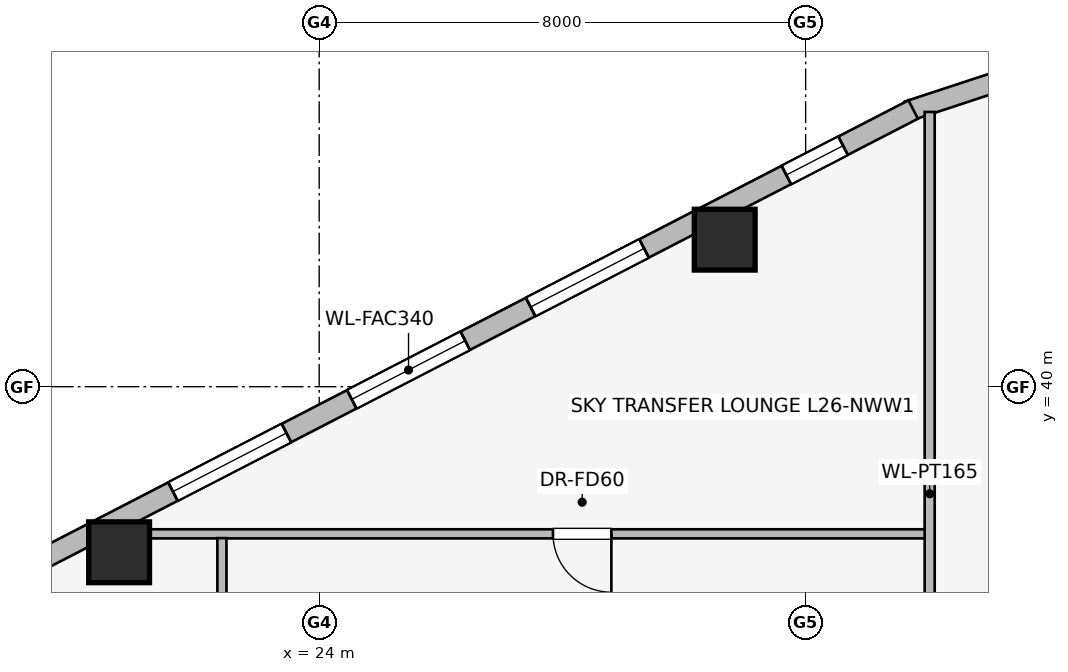
"""IFC4 building model, lengths in metres.
Left out: names, types, materials, properties, quantities, classifications, styles, units other than length and angle.
Written with IfcOpenShell. Run it as: python <this file> out.ifc"""

import sys

from ifc_helpers import new_model, si_unit, direction, frame, frame_2d, origin, origin_2d, place, context, subcontext, project, spatial, rectangle, extrude, element, fill, save


model = new_model("IFC4")
c1 = context("Model", 3, precision=1e-05, world=origin(), true_north=direction((0.0, 1.0)))
c2 = subcontext(c1, "Body", "Model", "MODEL_VIEW")
j1 = project(units=[si_unit("LENGTHUNIT", "METRE"), si_unit("PLANEANGLEUNIT", "RADIAN")], contexts=[c1])
p1 = place(None, origin())
s1 = spatial("IfcSite", under=j1, at=p1, CompositionType="ELEMENT")
p2 = place(p1, origin())
s2 = spatial("IfcBuilding", under=s1, at=p2, CompositionType="ELEMENT")
p3 = place(p2, frame((0.0, 0.0, 101.55)))
s3 = spatial("IfcBuildingStorey", under=s2, at=p3, CompositionType="ELEMENT", Elevation=101.55)
for number, where, z_axis, x_axis in (
    (1, (30.669, 42.418, 0.0), (0.0, 0.0, 1.0), (1.0, 0.0, 0.0)),
    (2, (20.709, 37.277, 0.0), (0.0, 0.0, 1.0), (1.0, 0.0, 0.0)),
):
    element("IfcColumn", number, at=place(p3, frame(where, z_axis=z_axis, x_axis=x_axis)), inside=s3, PredefinedType="COLUMN", context=c2, shape_type="SweptSolid", body=[
        extrude(rectangle(XDim=1.0, YDim=1.0, at=origin_2d()), origin(), (0.0, 0.0, 1.0), 3.45),
    ])
p4 = place(p3, frame((33.681, 44.532, 0.0), z_axis=(0.0, 0.0, 1.0), x_axis=(0.949937416267, 0.312440242569, 0.0)))
e3 = element("IfcWall", 3, at=p4, inside=s3, PredefinedType="STANDARD", context=c2, shape_type="SweptSolid", body=[
    extrude(rectangle(XDim=1.722, YDim=0.33, at=frame_2d((0.861, 0.0))), origin(), (0.0, 0.0, 1.0), 3.19),
])
p5 = place(p3, frame((17.169, 35.99, 0.0), z_axis=(0.0, 0.0, 1.0), x_axis=(0.888613612362, 0.458656568606, 0.0)))
e4 = element("IfcWall", 4, at=p5, inside=s3, PredefinedType="STANDARD", context=c2, shape_type="SweptSolid", body=[
    extrude(rectangle(XDim=18.681, YDim=0.34, at=frame_2d((9.34, 0.0))), origin(), (0.0, 0.0, 1.0), 2.494),
])
p6 = place(p5, frame((1.298, 0.0, 0.75)))
e5 = element("IfcOpeningElement", 5, at=p6, cuts=e4, PredefinedType="OPENING", context=c2, shape_type="SweptSolid", body=[
    extrude(rectangle(XDim=1.05, YDim=1.4, at=frame_2d((0.525, 0.7))), frame((0.0, 0.18, 0.0), z_axis=(0.0, -1.0, 0.0), x_axis=(1.0, 0.0, 0.0)), (0.0, 0.0, 1.0), 0.36),
])
p7 = place(p5, frame((4.981, 0.0, 0.75)))
e6 = element("IfcOpeningElement", 6, at=p7, cuts=e4, PredefinedType="OPENING", context=c2, shape_type="SweptSolid", body=[
    extrude(rectangle(XDim=2.1, YDim=1.5, at=frame_2d((1.05, 0.75))), frame((0.0, 0.18, 0.0), z_axis=(0.0, -1.0, 0.0), x_axis=(1.0, 0.0, 0.0)), (0.0, 0.0, 1.0), 0.36),
])
p8 = place(p5, frame((8.29, 0.0, 0.75)))
e7 = element("IfcOpeningElement", 7, at=p8, cuts=e4, PredefinedType="OPENING", context=c2, shape_type="SweptSolid", body=[
    extrude(rectangle(XDim=2.1, YDim=1.5, at=frame_2d((1.05, 0.75))), frame((0.0, 0.18, 0.0), z_axis=(0.0, -1.0, 0.0), x_axis=(1.0, 0.0, 0.0)), (0.0, 0.0, 1.0), 0.36),
])
p9 = place(p5, frame((11.6, 0.0, 0.75)))
e8 = element("IfcOpeningElement", 8, at=p9, cuts=e4, PredefinedType="OPENING", context=c2, shape_type="SweptSolid", body=[
    extrude(rectangle(XDim=2.1, YDim=1.5, at=frame_2d((1.05, 0.75))), frame((0.0, 0.18, 0.0), z_axis=(0.0, -1.0, 0.0), x_axis=(1.0, 0.0, 0.0)), (0.0, 0.0, 1.0), 0.36),
])
p10 = place(p5, frame((16.333, 0.0, 0.75)))
e9 = element("IfcOpeningElement", 9, at=p10, cuts=e4, PredefinedType="OPENING", context=c2, shape_type="SweptSolid", body=[
    extrude(rectangle(XDim=1.05, YDim=1.4, at=frame_2d((0.525, 0.7))), frame((0.0, 0.18, 0.0), z_axis=(0.0, -1.0, 0.0), x_axis=(1.0, 0.0, 0.0)), (0.0, 0.0, 1.0), 0.36),
])
p11 = place(p3, frame((34.0, 37.58, 0.0), z_axis=(0.0, 0.0, 1.0), x_axis=(-1.0, 0.0, 0.0)))
e10 = element("IfcWall", 10, at=p11, inside=s3, PredefinedType="PARTITIONING", context=c2, shape_type="SweptSolid", body=[
    extrude(rectangle(XDim=13.707, YDim=0.15, at=frame_2d((6.854, 0.0))), origin(), (0.0, 0.0, 1.0), 2.657),
])
p12 = place(p11, frame((5.195, 0.0, 0.0)))
e11 = element("IfcOpeningElement", 11, at=p12, cuts=e10, PredefinedType="OPENING", context=c2, shape_type="SweptSolid", body=[
    extrude(rectangle(XDim=0.96, YDim=2.0, at=frame_2d((0.48, 1.0))), frame((0.0, 0.085, 0.0), z_axis=(0.0, -1.0, 0.0), x_axis=(1.0, 0.0, 0.0)), (0.0, 0.0, 1.0), 0.17),
])
p13 = place(p3, frame((34.04, 31.96, 0.0), z_axis=(0.0, 0.0, 1.0), x_axis=(0.0, 1.0, 0.0)))
e12 = element("IfcWall", 12, at=p13, inside=s3, PredefinedType="PARTITIONING", context=c2, shape_type="SweptSolid", body=[
    extrude(rectangle(XDim=12.558, YDim=0.165, at=frame_2d((6.279, 0.0))), origin(), (0.0, 0.0, 1.0), 3.19),
])
p14 = place(p3, frame((22.4, 36.08, 0.0), z_axis=(0.0, 0.0, 1.0), x_axis=(0.0, 1.0, 0.0)))
e13 = element("IfcWall", 13, at=p14, inside=s3, PredefinedType="PARTITIONING", context=c2, shape_type="SweptSolid", body=[
    extrude(rectangle(XDim=1.43, YDim=0.15, at=frame_2d((0.715, 0.0))), origin(), (0.0, 0.0, 1.0), 3.19),
])
p15 = place(p7, origin())
e14 = element("IfcWindow", 14, at=p15, inside=s3, PartitioningType="SINGLE_PANEL", PredefinedType="WINDOW", context=c2, shape_type="SweptSolid", body=[
    extrude(rectangle(XDim=2.1, YDim=1.5, at=frame_2d((1.05, 0.75))), frame((0.0, 0.03, 0.0), z_axis=(0.0, -1.0, 0.0), x_axis=(1.0, 0.0, 0.0)), (0.0, 0.0, 1.0), 0.06),
])
fill(e6, e14)
p16 = place(p8, origin())
e15 = element("IfcWindow", 15, at=p16, inside=s3, PartitioningType="SINGLE_PANEL", PredefinedType="WINDOW", context=c2, shape_type="SweptSolid", body=[
    extrude(rectangle(XDim=2.1, YDim=1.5, at=frame_2d((1.05, 0.75))), frame((0.0, 0.03, 0.0), z_axis=(0.0, -1.0, 0.0), x_axis=(1.0, 0.0, 0.0)), (0.0, 0.0, 1.0), 0.06),
])
fill(e7, e15)
p17 = place(p9, origin())
e16 = element("IfcWindow", 16, at=p17, inside=s3, PartitioningType="SINGLE_PANEL", PredefinedType="WINDOW", context=c2, shape_type="SweptSolid", body=[
    extrude(rectangle(XDim=2.1, YDim=1.5, at=frame_2d((1.05, 0.75))), frame((0.0, 0.03, 0.0), z_axis=(0.0, -1.0, 0.0), x_axis=(1.0, 0.0, 0.0)), (0.0, 0.0, 1.0), 0.06),
])
fill(e8, e16)
p18 = place(p10, origin())
e17 = element("IfcWindow", 17, at=p18, inside=s3, PartitioningType="SINGLE_PANEL", PredefinedType="WINDOW", context=c2, shape_type="SweptSolid", body=[
    extrude(rectangle(XDim=1.05, YDim=1.4, at=frame_2d((0.525, 0.7))), frame((0.0, 0.03, 0.0), z_axis=(0.0, -1.0, 0.0), x_axis=(1.0, 0.0, 0.0)), (0.0, 0.0, 1.0), 0.06),
])
fill(e9, e17)
p19 = place(p12, origin())
e18 = element("IfcDoor", 18, at=p19, inside=s3, OperationType="SINGLE_SWING_LEFT", PredefinedType="DOOR", context=c2, shape_type="SweptSolid", body=[
    extrude(rectangle(XDim=0.96, YDim=2.0, at=frame_2d((0.48, 1.0))), frame((0.0, 0.025, 0.0), z_axis=(0.0, -1.0, 0.0), x_axis=(1.0, 0.0, 0.0)), (0.0, 0.0, 1.0), 0.05),
])
fill(e11, e18)
save(model, sys.argv[1])
